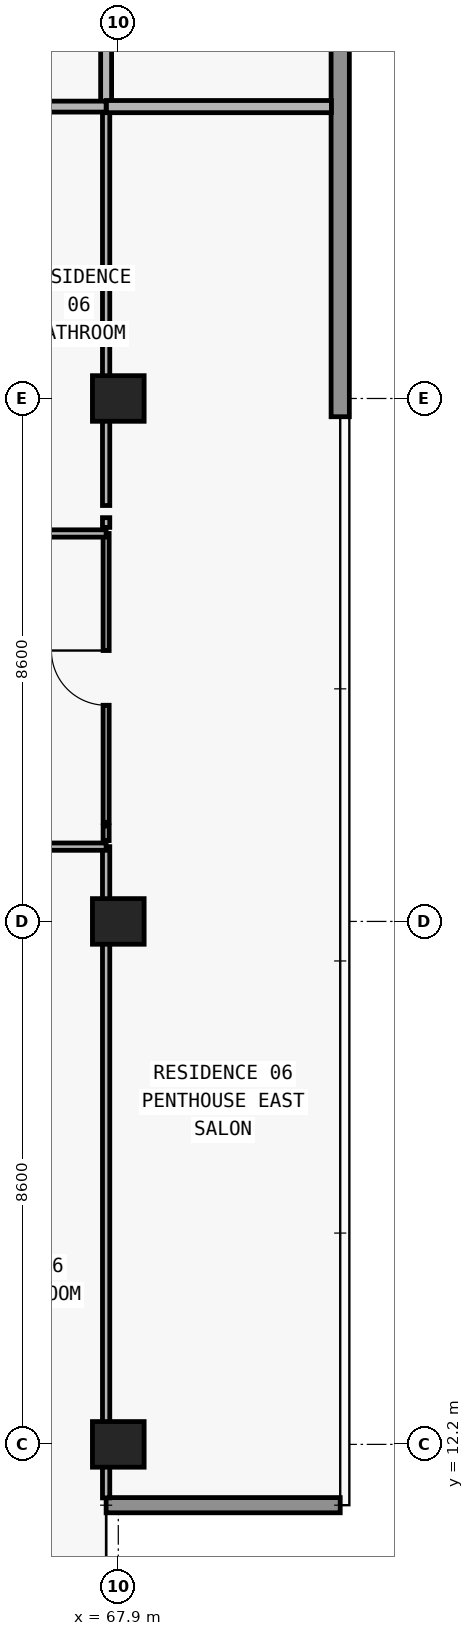
"""IFC4 building model, lengths in metres.
Left out: names, types, materials, properties, quantities, classifications, styles, units other than length and angle.
Written with IfcOpenShell. Run it as: python <this file> out.ifc"""

import sys

from ifc_helpers import new_model, si_unit, direction, frame, frame_2d, origin, origin_2d, place, context, subcontext, project, spatial, rectangle, extrude, element, fill, save


model = new_model("IFC4")
c1 = context("Model", 3, precision=1e-05, world=origin(), true_north=direction((0.0, 1.0)))
c2 = subcontext(c1, "Body", "Model", "MODEL_VIEW")
j1 = project(units=[si_unit("LENGTHUNIT", "METRE"), si_unit("PLANEANGLEUNIT", "RADIAN")], contexts=[c1])
p1 = place(None, origin())
s1 = spatial("IfcSite", under=j1, at=p1, CompositionType="ELEMENT")
p2 = place(p1, origin())
s2 = spatial("IfcBuilding", under=s1, at=p2, CompositionType="ELEMENT")
p3 = place(p2, frame((0.0, 0.0, 160.5)))
s3 = spatial("IfcBuildingStorey", under=s2, at=p3, CompositionType="ELEMENT", Elevation=160.5)
for number, where, z_axis, x_axis in (
    (1, (67.9, 12.2, 0.0), (0.0, 0.0, 1.0), (1.0, 0.0, 0.0)),
    (2, (67.9, 20.8, 0.0), (0.0, 0.0, 1.0), (1.0, 0.0, 0.0)),
    (3, (67.9, 29.4, 0.0), (0.0, 0.0, 1.0), (1.0, 0.0, 0.0)),
):
    element("IfcColumn", number, at=place(p3, frame(where, z_axis=z_axis, x_axis=x_axis)), inside=s3, PredefinedType="COLUMN", context=c2, shape_type="SweptSolid", body=[
        extrude(rectangle(XDim=0.85, YDim=0.75, at=origin_2d()), origin(), (0.0, 0.0, 1.0), 3.05),
    ])
p4 = place(p3, frame((67.7, 11.2, 0.0), z_axis=(0.0, 0.0, 1.0), x_axis=(1.0, 0.0, 0.0)))
e4 = element("IfcWall", 4, at=p4, inside=s3, PredefinedType="ELEMENTEDWALL", context=c2, shape_type="SweptSolid", body=[
    extrude(rectangle(XDim=3.85, YDim=0.25, at=frame_2d((1.925, 0.0))), origin(), (0.0, 0.0, 1.0), 3.05),
])
p5 = place(p3, frame((71.55, 47.0, 0.0), z_axis=(0.0, 0.0, 1.0), x_axis=(0.0, -1.0, 0.0)))
e5 = element("IfcWall", 5, at=p5, inside=s3, PredefinedType="STANDARD", context=c2, shape_type="SweptSolid", body=[
    extrude(rectangle(XDim=17.9, YDim=0.3, at=frame_2d((8.95, 0.0))), origin(), (0.0, 0.0, 1.0), 3.05),
])
p6 = place(p3, frame((67.7, 11.32, 0.0), z_axis=(0.0, 0.0, 1.0), x_axis=(0.0, 1.0, 0.0)))
e6 = element("IfcWall", 6, at=p6, inside=s3, PredefinedType="PARTITIONING", context=c2, shape_type="SweptSolid", body=[
    extrude(rectangle(XDim=10.71, YDim=0.12, at=frame_2d((5.355, 0.0))), origin(), (0.0, 0.0, 1.0), 2.263),
])
p7 = place(p3, frame((67.7, 22.13, 0.0), z_axis=(0.0, 0.0, 1.0), x_axis=(0.0, 1.0, 0.0)))
e7 = element("IfcWall", 7, at=p7, inside=s3, PredefinedType="MOVABLE", context=c2, shape_type="SweptSolid", body=[
    extrude(rectangle(XDim=0.24, YDim=0.1, at=frame_2d((0.12, 0.0))), origin(), (0.0, 0.0, 1.0), 2.263),
])
p8 = place(p3, frame((67.7, 22.43, 0.0), z_axis=(0.0, 0.0, 1.0), x_axis=(0.0, 1.0, 0.0)))
e8 = element("IfcWall", 8, at=p8, inside=s3, PredefinedType="MOVABLE", context=c2, shape_type="SweptSolid", body=[
    extrude(rectangle(XDim=4.75, YDim=0.1, at=frame_2d((2.375, 0.0))), origin(), (0.0, 0.0, 1.0), 2.263),
])
p9 = place(p8, frame((1.925, 0.0, 0.0)))
e9 = element("IfcOpeningElement", 9, at=p9, cuts=e8, PredefinedType="OPENING", context=c2, shape_type="SweptSolid", body=[
    extrude(rectangle(XDim=0.9, YDim=2.15, at=frame_2d((0.45, 1.075))), frame((0.0, 0.06, 0.0), z_axis=(0.0, -1.0, 0.0), x_axis=(1.0, 0.0, 0.0)), (0.0, 0.0, 1.0), 0.12),
])
p10 = place(p3, frame((67.7, 27.28, 0.0), z_axis=(0.0, 0.0, 1.0), x_axis=(0.0, 1.0, 0.0)))
e10 = element("IfcWall", 10, at=p10, inside=s3, PredefinedType="PARTITIONING", context=c2, shape_type="SweptSolid", body=[
    extrude(rectangle(XDim=0.16, YDim=0.12, at=frame_2d((0.08, 0.0))), origin(), (0.0, 0.0, 1.0), 2.263),
])
p11 = place(p3, frame((67.7, 27.64, 0.0), z_axis=(0.0, 0.0, 1.0), x_axis=(0.0, 1.0, 0.0)))
e11 = element("IfcWall", 11, at=p11, inside=s3, PredefinedType="PARTITIONING", context=c2, shape_type="SweptSolid", body=[
    extrude(rectangle(XDim=6.56, YDim=0.12, at=frame_2d((3.28, 0.0))), origin(), (0.0, 0.0, 1.0), 2.263),
])
p12 = place(p3, frame((67.7, 34.205, 0.0), z_axis=(0.0, 0.0, 1.0), x_axis=(0.0, 1.0, 0.0)))
e12 = element("IfcWall", 12, at=p12, inside=s3, PredefinedType="PARTITIONING", context=c2, shape_type="SweptSolid", body=[
    extrude(rectangle(XDim=2.745, YDim=0.18, at=frame_2d((1.373, 0.0))), origin(), (0.0, 0.0, 1.0), 2.263),
])
p13 = place(p3, frame((59.55, 22.03, 0.0), z_axis=(0.0, 0.0, 1.0), x_axis=(1.0, 0.0, 0.0)))
e13 = element("IfcWall", 13, at=p13, inside=s3, PredefinedType="PARTITIONING", context=c2, shape_type="SweptSolid", body=[
    extrude(rectangle(XDim=8.15, YDim=0.12, at=frame_2d((4.075, 0.0))), origin(), (0.0, 0.0, 1.0), 3.05),
])
p14 = place(p13, frame((1.614, 0.0, 0.0)))
e14 = element("IfcOpeningElement", 14, at=p14, cuts=e13, PredefinedType="OPENING", context=c2, shape_type="SweptSolid", body=[
    extrude(rectangle(XDim=0.9, YDim=2.15, at=frame_2d((0.45, 1.075))), frame((0.0, 0.07, 0.0), z_axis=(0.0, -1.0, 0.0), x_axis=(1.0, 0.0, 0.0)), (0.0, 0.0, 1.0), 0.14),
])
p15 = place(p13, frame((5.855, 0.0, 0.0)))
e15 = element("IfcOpeningElement", 15, at=p15, cuts=e13, PredefinedType="OPENING", context=c2, shape_type="SweptSolid", body=[
    extrude(rectangle(XDim=0.9, YDim=2.15, at=frame_2d((0.45, 1.075))), frame((0.0, 0.07, 0.0), z_axis=(0.0, -1.0, 0.0), x_axis=(1.0, 0.0, 0.0)), (0.0, 0.0, 1.0), 0.14),
])
p16 = place(p3, frame((59.55, 27.18, 0.0), z_axis=(0.0, 0.0, 1.0), x_axis=(1.0, 0.0, 0.0)))
e16 = element("IfcWall", 16, at=p16, inside=s3, PredefinedType="PARTITIONING", context=c2, shape_type="SweptSolid", body=[
    extrude(rectangle(XDim=8.15, YDim=0.12, at=frame_2d((4.075, 0.0))), origin(), (0.0, 0.0, 1.0), 3.05),
])
p17 = place(p16, frame((1.614, 0.0, 0.0)))
e17 = element("IfcOpeningElement", 17, at=p17, cuts=e16, PredefinedType="OPENING", context=c2, shape_type="SweptSolid", body=[
    extrude(rectangle(XDim=0.9, YDim=2.15, at=frame_2d((0.45, 1.075))), frame((0.0, 0.07, 0.0), z_axis=(0.0, -1.0, 0.0), x_axis=(1.0, 0.0, 0.0)), (0.0, 0.0, 1.0), 0.14),
])
p18 = place(p3, frame((59.55, 34.2, 0.0), z_axis=(0.0, 0.0, 1.0), x_axis=(1.0, 0.0, 0.0)))
e18 = element("IfcWall", 18, at=p18, inside=s3, PredefinedType="PARTITIONING", context=c2, shape_type="SweptSolid", body=[
    extrude(rectangle(XDim=8.15, YDim=0.18, at=frame_2d((4.075, 0.0))), origin(), (0.0, 0.0, 1.0), 3.05),
])
p19 = place(p18, frame((2.75, 0.0, 0.0)))
e19 = element("IfcOpeningElement", 19, at=p19, cuts=e18, PredefinedType="OPENING", context=c2, shape_type="SweptSolid", body=[
    extrude(rectangle(XDim=1.0, YDim=2.2, at=frame_2d((0.5, 1.1))), frame((0.0, 0.1, 0.0), z_axis=(0.0, -1.0, 0.0), x_axis=(1.0, 0.0, 0.0)), (0.0, 0.0, 1.0), 0.2),
])
p20 = place(p3, frame((67.705, 34.2, 0.0), z_axis=(0.0, 0.0, 1.0), x_axis=(1.0, 0.0, 0.0)))
e20 = element("IfcWall", 20, at=p20, inside=s3, PredefinedType="PARTITIONING", context=c2, shape_type="SweptSolid", body=[
    extrude(rectangle(XDim=3.7, YDim=0.2, at=frame_2d((1.85, 0.0))), origin(), (0.0, 0.0, 1.0), 3.05),
])
p21 = place(p9, origin())
e21 = element("IfcDoor", 21, at=p21, inside=s3, OperationType="SINGLE_SWING_RIGHT", PredefinedType="DOOR", context=c2, shape_type="SweptSolid", body=[
    extrude(rectangle(XDim=0.9, YDim=2.15, at=frame_2d((0.45, 1.075))), frame((0.0, 0.025, 0.0), z_axis=(0.0, -1.0, 0.0), x_axis=(1.0, 0.0, 0.0)), (0.0, 0.0, 1.0), 0.05),
])
fill(e9, e21)
save(model, sys.argv[1])
